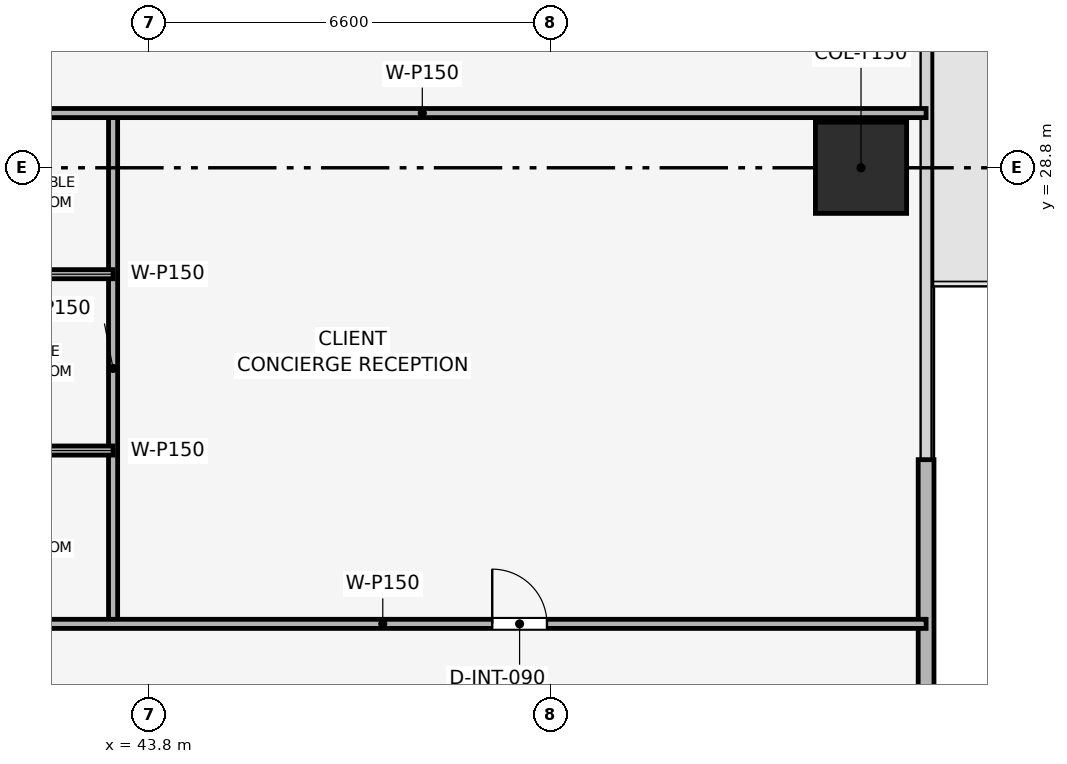
"""IFC4 building model, lengths in metres.
Left out: names, types, materials, properties, quantities, classifications, styles, units other than length and angle.
Written with IfcOpenShell. Run it as: python <this file> out.ifc"""

import sys

from ifc_helpers import new_model, si_unit, direction, frame, frame_2d, origin, origin_2d, place, context, subcontext, project, spatial, rectangle, extrude, element, fill, save


model = new_model("IFC4")
c1 = context("Model", 3, precision=1e-05, world=origin(), true_north=direction((0.0, 1.0)))
c2 = subcontext(c1, "Body", "Model", "MODEL_VIEW")
j1 = project(units=[si_unit("LENGTHUNIT", "METRE"), si_unit("PLANEANGLEUNIT", "RADIAN")], contexts=[c1])
p1 = place(None, origin())
s1 = spatial("IfcSite", under=j1, at=p1, CompositionType="ELEMENT")
p2 = place(p1, origin())
s2 = spatial("IfcBuilding", under=s1, at=p2, CompositionType="ELEMENT")
p3 = place(p2, frame((0.0, 0.0, 72.9)))
s3 = spatial("IfcBuildingStorey", under=s2, at=p3, CompositionType="ELEMENT", Elevation=72.9)
p4 = place(p3, frame((55.5, 28.8, 0.003), z_axis=(0.0, 0.0, 1.0), x_axis=(1.0, 0.0, 0.0)))
e1 = element("IfcColumn", 1, at=p4, inside=s3, PredefinedType="COLUMN", context=c2, shape_type="SweptSolid", body=[
    extrude(rectangle(XDim=1.5, YDim=1.5, at=origin_2d()), origin(), (0.0, 0.0, 1.0), 3.644),
])
p5 = place(p3, frame((56.57, 24.0, 0.0), z_axis=(0.0, 0.0, 1.0), x_axis=(0.0, -1.0, 0.0)))
e2 = element("IfcWall", 2, at=p5, inside=s3, PredefinedType="SOLIDWALL", context=c2, shape_type="SweptSolid", body=[
    extrude(rectangle(XDim=15.3, YDim=0.26, at=frame_2d((7.65, 0.0))), origin(), (0.0, 0.0, 1.0), 3.65),
])
p6 = place(p5, frame((11.25, 0.0, 0.9)))
e3 = element("IfcOpeningElement", 3, at=p6, cuts=e2, PredefinedType="OPENING", context=c2, shape_type="SweptSolid", body=[
    extrude(rectangle(XDim=3.8, YDim=1.9, at=frame_2d((1.9, 0.95))), frame((0.0, 0.14, 0.0), z_axis=(0.0, -1.0, 0.0), x_axis=(1.0, 0.0, 0.0)), (0.0, 0.0, 1.0), 0.28),
])
p7 = place(p3, frame((43.2, 21.3, 0.0), z_axis=(0.0, 0.0, 1.0), x_axis=(0.0, 1.0, 0.0)))
e4 = element("IfcWall", 4, at=p7, inside=s3, PredefinedType="PARTITIONING", context=c2, shape_type="SweptSolid", body=[
    extrude(rectangle(XDim=8.4, YDim=0.15, at=frame_2d((4.2, 0.0))), origin(), (0.0, 0.0, 1.0), 3.085),
])
p8 = place(p3, frame((40.0, 21.3, 0.0), z_axis=(0.0, 0.0, 1.0), x_axis=(1.0, 0.0, 0.0)))
e5 = element("IfcWall", 5, at=p8, inside=s3, PredefinedType="PARTITIONING", context=c2, shape_type="SweptSolid", body=[
    extrude(rectangle(XDim=16.57, YDim=0.15, at=frame_2d((8.285, 0.0))), origin(), (0.0, 0.0, 1.0), 2.935),
])
p9 = place(p8, frame((9.435, 0.0, 0.0)))
e6 = element("IfcOpeningElement", 6, at=p9, cuts=e5, PredefinedType="OPENING", context=c2, shape_type="SweptSolid", body=[
    extrude(rectangle(XDim=0.9, YDim=2.1, at=frame_2d((0.45, 1.05))), frame((0.0, 0.085, 0.0), z_axis=(0.0, -1.0, 0.0), x_axis=(1.0, 0.0, 0.0)), (0.0, 0.0, 1.0), 0.17),
])
p10 = place(p3, frame((40.0, 29.7, 0.0), z_axis=(0.0, 0.0, 1.0), x_axis=(1.0, 0.0, 0.0)))
e7 = element("IfcWall", 7, at=p10, inside=s3, PredefinedType="PARTITIONING", context=c2, shape_type="SweptSolid", body=[
    extrude(rectangle(XDim=16.57, YDim=0.15, at=frame_2d((8.285, 0.0))), origin(), (0.0, 0.0, 1.0), 2.935),
])
for number, where, z_axis, x_axis in (
    (8, (40.0, 24.15, 0.0), (0.0, 0.0, 1.0), (1.0, 0.0, 0.0)),
    (9, (40.0, 27.05, 0.0), (0.0, 0.0, 1.0), (1.0, 0.0, 0.0)),
):
    element("IfcWall", number, at=place(p3, frame(where, z_axis=z_axis, x_axis=x_axis)), inside=s3, PredefinedType="PARTITIONING", context=c2, shape_type="SweptSolid", body=[
        extrude(rectangle(XDim=3.2, YDim=0.15, at=frame_2d((1.6, 0.0))), origin(), (0.0, 0.0, 1.0), 3.65),
    ])
p11 = place(p9, origin())
e10 = element("IfcDoor", 10, at=p11, inside=s3, OperationType="SINGLE_SWING_LEFT", PredefinedType="DOOR", context=c2, shape_type="SweptSolid", body=[
    extrude(rectangle(XDim=0.9, YDim=2.1, at=frame_2d((0.45, 1.05))), frame((0.0, 0.025, 0.0), z_axis=(0.0, -1.0, 0.0), x_axis=(1.0, 0.0, 0.0)), (0.0, 0.0, 1.0), 0.05),
])
fill(e6, e10)
save(model, sys.argv[1])
